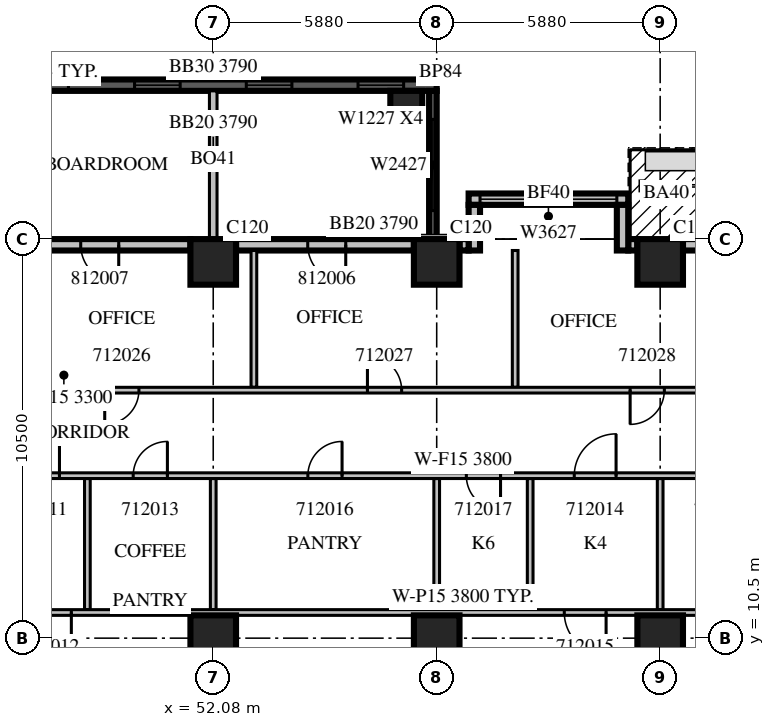
"""IFC4 building model, lengths in metres.
Left out: names, types, materials, properties, quantities, classifications, styles, units other than length and angle.
Written with IfcOpenShell. Run it as: python <this file> out.ifc"""

import sys

from ifc_helpers import new_model, si_unit, direction, frame, frame_2d, origin, origin_2d, place, context, subcontext, project, spatial, rectangle, extrude, source, transform, mapped, element, fill, save


model = new_model("IFC4")
c1 = context("Model", 3, precision=1e-05, world=origin(), true_north=direction((0.0, 1.0)))
c2 = subcontext(c1, "Body", "Model", "MODEL_VIEW")
j1 = project(units=[si_unit("LENGTHUNIT", "METRE"), si_unit("PLANEANGLEUNIT", "RADIAN")], contexts=[c1])
p1 = place(None, origin())
s1 = spatial("IfcSite", under=j1, at=p1, CompositionType="ELEMENT")
p2 = place(p1, origin())
s2 = spatial("IfcBuilding", under=s1, at=p2, CompositionType="ELEMENT")
p3 = place(p2, frame((0.0, 0.0, 61.5)))
s3 = spatial("IfcBuildingStorey", under=s2, at=p3, CompositionType="ELEMENT", Elevation=61.5)
m1 = source(origin(), c2, "Body", "SweptSolid", [
    extrude(rectangle(XDim=1.2, YDim=1.2, at=origin_2d()), origin(), (0.0, 0.0, 1.0), 4.2),
])
for number, where, z_axis, x_axis in (
    (1, (52.08, 10.5, 0.0), (0.0, 0.0, 1.0), (1.0, 0.0, 0.0)),
    (2, (57.96, 10.5, 0.0), (0.0, 0.0, 1.0), (1.0, 0.0, 0.0)),
    (3, (63.84, 10.5, 0.0), (0.0, 0.0, 1.0), (1.0, 0.0, 0.0)),
    (4, (52.08, 20.4, 0.0), (0.0, 0.0, 1.0), (1.0, 0.0, 0.0)),
    (5, (57.96, 20.4, 0.0), (0.0, 0.0, 1.0), (1.0, 0.0, 0.0)),
    (6, (63.84, 20.4, 0.0), (0.0, 0.0, 1.0), (1.0, 0.0, 0.0)),
):
    element("IfcColumn", number, at=place(p3, frame(where, z_axis=z_axis, x_axis=x_axis)), inside=s3, PredefinedType="COLUMN", context=c2, shape_type="MappedRepresentation", body=[
        mapped(m1, transform((0.0, 0.0, 0.0), scale=1.0)),
    ])
m2 = source(origin(), c2, "Body", "SweptSolid", [
    extrude(rectangle(XDim=0.84, YDim=0.84, at=origin_2d()), origin(), (0.0, 0.0, 1.0), 4.2),
])
p4 = place(p3, frame((57.16, 24.48, 0.0), z_axis=(0.0, 0.0, 1.0), x_axis=(1.0, 0.0, 0.0)))
e7 = element("IfcColumn", 7, at=p4, inside=s3, PredefinedType="COLUMN", context=c2, shape_type="MappedRepresentation", body=[
    mapped(m2, transform((0.0, 0.0, 0.0), scale=1.0)),
])
m3 = source(origin(), c2, "Body", "SweptSolid", [
    extrude(rectangle(XDim=11.76, YDim=0.3, at=frame_2d((5.88, 0.0))), origin(), (0.0, 0.0, 1.0), 3.79),
])
p5 = place(p3, frame((57.96, 25.05, 0.0), z_axis=(0.0, 0.0, 1.0), x_axis=(-1.0, 0.0, 0.0)))
e8 = element("IfcWall", 8, at=p5, inside=s3, PredefinedType="SOLIDWALL", context=c2, shape_type="MappedRepresentation", body=[
    mapped(m3, transform((0.0, 0.0, 0.0), scale=1.0)),
])
m4 = source(origin(), c2, "Body", "SweptSolid", [
    extrude(rectangle(XDim=1.2, YDim=2.7, at=frame_2d((0.6, 1.35))), frame((0.0, 0.16, 0.0), z_axis=(0.0, -1.0, 0.0), x_axis=(1.0, 0.0, 0.0)), (0.0, 0.0, 1.0), 0.32),
])
p6 = place(p5, frame((0.87, 0.0, 0.6)))
e9 = element("IfcOpeningElement", 9, at=p6, cuts=e8, PredefinedType="OPENING", context=c2, shape_type="MappedRepresentation", body=[
    mapped(m4, transform((0.0, 0.0, 0.0), scale=1.0)),
])
p7 = place(p5, frame((3.81, 0.0, 0.6)))
e10 = element("IfcOpeningElement", 10, at=p7, cuts=e8, PredefinedType="OPENING", context=c2, shape_type="MappedRepresentation", body=[
    mapped(m4, transform((0.0, 0.0, 0.0), scale=1.0)),
])
p8 = place(p5, frame((6.75, 0.0, 0.6)))
e11 = element("IfcOpeningElement", 11, at=p8, cuts=e8, PredefinedType="OPENING", context=c2, shape_type="MappedRepresentation", body=[
    mapped(m4, transform((0.0, 0.0, 0.0), scale=1.0)),
])
p9 = place(p5, frame((9.69, 0.0, 0.6)))
e12 = element("IfcOpeningElement", 12, at=p9, cuts=e8, PredefinedType="OPENING", context=c2, shape_type="MappedRepresentation", body=[
    mapped(m4, transform((0.0, 0.0, 0.0), scale=1.0)),
])
m5 = source(origin(), c2, "Body", "SweptSolid", [
    extrude(rectangle(XDim=3.9, YDim=0.2, at=frame_2d((1.95, 0.0))), origin(), (0.0, 0.0, 1.0), 3.79),
])
p10 = place(p3, frame((52.08, 21.0, 0.0), z_axis=(0.0, 0.0, 1.0), x_axis=(0.0, 1.0, 0.0)))
e13 = element("IfcWall", 13, at=p10, inside=s3, PredefinedType="SOLIDWALL", context=c2, shape_type="MappedRepresentation", body=[
    mapped(m5, transform((0.0, 0.0, 0.0), scale=1.0)),
])
m6 = source(origin(), c2, "Body", "SweptSolid", [
    extrude(rectangle(XDim=3.9, YDim=0.2, at=frame_2d((1.95, 0.0))), origin(), (0.0, 0.0, 1.0), 3.79),
])
p11 = place(p3, frame((57.86, 21.0, 0.0), z_axis=(0.0, 0.0, 1.0), x_axis=(0.0, 1.0, 0.0)))
e14 = element("IfcWall", 14, at=p11, inside=s3, PredefinedType="SOLIDWALL", context=c2, shape_type="MappedRepresentation", body=[
    mapped(m6, transform((0.0, 0.0, 0.0), scale=1.0)),
])
m7 = source(origin(), c2, "Body", "SweptSolid", [
    extrude(rectangle(XDim=2.4, YDim=2.7, at=frame_2d((1.2, 1.35))), frame((0.0, 0.11, 0.0), z_axis=(0.0, -1.0, 0.0), x_axis=(1.0, 0.0, 0.0)), (0.0, 0.0, 1.0), 0.22),
])
p12 = place(p11, frame((0.75, 0.0, 0.6)))
e15 = element("IfcOpeningElement", 15, at=p12, cuts=e14, PredefinedType="OPENING", context=c2, shape_type="MappedRepresentation", body=[
    mapped(m7, transform((0.0, 0.0, 0.0), scale=1.0)),
])
m8 = source(origin(), c2, "Body", "SweptSolid", [
    extrude(rectangle(XDim=2.76, YDim=0.3, at=frame_2d((1.38, 0.0))), origin(), (0.0, 0.0, 1.0), 3.8),
])
p13 = place(p3, frame((67.2, 20.85, 0.0), z_axis=(0.0, 0.0, 1.0), x_axis=(-1.0, 0.0, 0.0)))
e16 = element("IfcWall", 16, at=p13, inside=s3, PredefinedType="STANDARD", context=c2, shape_type="MappedRepresentation", body=[
    mapped(m8, transform((0.0, 0.0, 0.0), scale=1.0)),
])
m9 = source(origin(), c2, "Body", "SweptSolid", [
    extrude(rectangle(XDim=1.8, YDim=2.4, at=frame_2d((0.9, 1.2))), frame((0.0, 0.16, 0.0), z_axis=(0.0, -1.0, 0.0), x_axis=(1.0, 0.0, 0.0)), (0.0, 0.0, 1.0), 0.32),
])
p14 = place(p13, frame((0.45, 0.0, 0.0)))
e17 = element("IfcOpeningElement", 17, at=p14, cuts=e16, PredefinedType="OPENING", context=c2, shape_type="MappedRepresentation", body=[
    mapped(m9, transform((0.0, 0.0, 0.0), scale=1.0)),
])
m10 = source(origin(), c2, "Body", "SweptSolid", [
    extrude(rectangle(XDim=0.24, YDim=0.3, at=frame_2d((0.12, 0.0))), origin(), (0.0, 0.0, 1.0), 3.8),
])
p15 = place(p3, frame((63.24, 20.85, 0.0), z_axis=(0.0, 0.0, 1.0), x_axis=(-1.0, 0.0, 0.0)))
e18 = element("IfcWall", 18, at=p15, inside=s3, PredefinedType="STANDARD", context=c2, shape_type="MappedRepresentation", body=[
    mapped(m10, transform((0.0, 0.0, 0.0), scale=1.0)),
])
m11 = source(origin(), c2, "Body", "SweptSolid", [
    extrude(rectangle(XDim=4.2, YDim=0.3, at=frame_2d((2.1, 0.0))), origin(), (0.0, 0.0, 1.0), 3.8),
])
p16 = place(p3, frame((63.0, 22.05, 0.0), z_axis=(0.0, 0.0, 1.0), x_axis=(-1.0, 0.0, 0.0)))
e19 = element("IfcWall", 19, at=p16, inside=s3, PredefinedType="STANDARD", context=c2, shape_type="MappedRepresentation", body=[
    mapped(m11, transform((0.0, 0.0, 0.0), scale=1.0)),
])
m12 = source(origin(), c2, "Body", "SweptSolid", [
    extrude(rectangle(XDim=3.6, YDim=2.7, at=frame_2d((1.8, 1.35))), frame((0.0, 0.16, 0.0), z_axis=(0.0, -1.0, 0.0), x_axis=(1.0, 0.0, 0.0)), (0.0, 0.0, 1.0), 0.32),
])
p17 = place(p16, frame((0.3, 0.0, 0.6)))
e20 = element("IfcOpeningElement", 20, at=p17, cuts=e19, PredefinedType="OPENING", context=c2, shape_type="MappedRepresentation", body=[
    mapped(m12, transform((0.0, 0.0, 0.0), scale=1.0)),
])
m13 = source(origin(), c2, "Body", "SweptSolid", [
    extrude(rectangle(XDim=1.2, YDim=0.3, at=frame_2d((0.6, 0.0))), origin(), (0.0, 0.0, 1.0), 3.8),
])
for number, where, z_axis, x_axis in (
    (21, (62.85, 20.7, 0.0), (0.0, 0.0, 1.0), (0.0, 1.0, 0.0)),
    (22, (58.95, 20.7, 0.0), (0.0, 0.0, 1.0), (0.0, 1.0, 0.0)),
):
    element("IfcWall", number, at=place(p3, frame(where, z_axis=z_axis, x_axis=x_axis)), inside=s3, PredefinedType="STANDARD", context=c2, shape_type="MappedRepresentation", body=[
        mapped(m13, transform((0.0, 0.0, 0.0), scale=1.0)),
    ])
p18 = place(p3, frame((58.8, 20.85, 0.0), z_axis=(0.0, 0.0, 1.0), x_axis=(-1.0, 0.0, 0.0)))
e23 = element("IfcWall", 23, at=p18, inside=s3, PredefinedType="STANDARD", context=c2, shape_type="MappedRepresentation", body=[
    mapped(m10, transform((0.0, 0.0, 0.0), scale=1.0)),
])
m14 = source(origin(), c2, "Body", "SweptSolid", [
    extrude(rectangle(XDim=4.68, YDim=0.3, at=frame_2d((2.34, 0.0))), origin(), (0.0, 0.0, 1.0), 3.8),
])
p19 = place(p3, frame((57.36, 20.85, 0.0), z_axis=(0.0, 0.0, 1.0), x_axis=(-1.0, 0.0, 0.0)))
e24 = element("IfcWall", 24, at=p19, inside=s3, PredefinedType="STANDARD", context=c2, shape_type="MappedRepresentation", body=[
    mapped(m14, transform((0.0, 0.0, 0.0), scale=1.0)),
])
m15 = source(origin(), c2, "Body", "SweptSolid", [
    extrude(rectangle(XDim=1.0, YDim=2.1, at=frame_2d((0.5, 1.05))), frame((0.0, 0.16, 0.0), z_axis=(0.0, -1.0, 0.0), x_axis=(1.0, 0.0, 0.0)), (0.0, 0.0, 1.0), 0.32),
])
p20 = place(p19, frame((1.793, 0.0, 0.0)))
e25 = element("IfcOpeningElement", 25, at=p20, cuts=e24, PredefinedType="OPENING", context=c2, shape_type="MappedRepresentation", body=[
    mapped(m15, transform((0.0, 0.0, 0.0), scale=1.0)),
])
p21 = place(p3, frame((51.48, 20.85, 0.0), z_axis=(0.0, 0.0, 1.0), x_axis=(-1.0, 0.0, 0.0)))
e26 = element("IfcWall", 26, at=p21, inside=s3, PredefinedType="STANDARD", context=c2, shape_type="MappedRepresentation", body=[
    mapped(m14, transform((0.0, 0.0, 0.0), scale=1.0)),
])
p22 = place(p21, frame((1.887, 0.0, 0.0)))
e27 = element("IfcOpeningElement", 27, at=p22, cuts=e26, PredefinedType="OPENING", context=c2, shape_type="MappedRepresentation", body=[
    mapped(m15, transform((0.0, 0.0, 0.0), scale=1.0)),
])
m16 = source(origin(), c2, "Body", "SweptSolid", [
    extrude(rectangle(XDim=3.45, YDim=0.15, at=frame_2d((1.725, 0.0))), origin(), (0.0, 0.0, 1.0), 3.8),
])
for number, where, z_axis, x_axis in (
    (28, (48.768, 11.25, 0.0), (0.0, 0.0, 1.0), (0.0, 1.0, 0.0)),
    (29, (57.96, 11.25, 0.0), (0.0, 0.0, 1.0), (0.0, 1.0, 0.0)),
    (30, (60.42, 11.25, 0.0), (0.0, 0.0, 1.0), (0.0, 1.0, 0.0)),
    (31, (52.08, 11.25, 0.0), (0.0, 0.0, 1.0), (0.0, 1.0, 0.0)),
    (32, (63.84, 11.25, 0.0), (0.0, 0.0, 1.0), (0.0, 1.0, 0.0)),
):
    element("IfcWall", number, at=place(p3, frame(where, z_axis=z_axis, x_axis=x_axis)), inside=s3, PredefinedType="PARTITIONING", context=c2, shape_type="MappedRepresentation", body=[
        mapped(m16, transform((0.0, 0.0, 0.0), scale=1.0)),
    ])
m17 = source(origin(), c2, "Body", "SweptSolid", [
    extrude(rectangle(XDim=24.9, YDim=0.15, at=frame_2d((12.45, 0.0))), origin(), (0.0, 0.0, 1.0), 3.8),
])
p23 = place(p3, frame((71.1, 11.175, 0.0), z_axis=(0.0, 0.0, 1.0), x_axis=(-1.0, 0.0, 0.0)))
e33 = element("IfcWall", 33, at=p23, inside=s3, PredefinedType="PARTITIONING", context=c2, shape_type="MappedRepresentation", body=[
    mapped(m17, transform((0.0, 0.0, 0.0), scale=1.0)),
])
m18 = source(origin(), c2, "Body", "SweptSolid", [
    extrude(rectangle(XDim=1.1, YDim=2.1, at=frame_2d((0.55, 1.05))), frame((0.0, 0.085, 0.0), z_axis=(0.0, -1.0, 0.0), x_axis=(1.0, 0.0, 0.0)), (0.0, 0.0, 1.0), 0.17),
])
p24 = place(p23, frame((22.753, 0.0, 0.0)))
e34 = element("IfcOpeningElement", 34, at=p24, cuts=e33, PredefinedType="OPENING", context=c2, shape_type="MappedRepresentation", body=[
    mapped(m18, transform((0.0, 0.0, 0.0), scale=1.0)),
])
p25 = place(p23, frame((8.683, 0.0, 0.0)))
e35 = element("IfcOpeningElement", 35, at=p25, cuts=e33, PredefinedType="OPENING", context=c2, shape_type="MappedRepresentation", body=[
    mapped(m18, transform((0.0, 0.0, 0.0), scale=1.0)),
])
p26 = place(p23, frame((4.738, 0.0, 0.0)))
e36 = element("IfcOpeningElement", 36, at=p26, cuts=e33, PredefinedType="OPENING", context=c2, shape_type="MappedRepresentation", body=[
    mapped(m18, transform((0.0, 0.0, 0.0), scale=1.0)),
])
m19 = source(origin(), c2, "Body", "SweptSolid", [
    extrude(rectangle(XDim=3.6, YDim=0.15, at=frame_2d((1.8, 0.0))), origin(), (0.0, 0.0, 1.0), 3.8),
])
for number, where, z_axis, x_axis in (
    (37, (53.15, 20.7, 0.0), (0.0, 0.0, 1.0), (0.0, -1.0, 0.0)),
    (38, (60.025, 20.7, 0.0), (0.0, 0.0, 1.0), (0.0, -1.0, 0.0)),
):
    element("IfcWall", number, at=place(p3, frame(where, z_axis=z_axis, x_axis=x_axis)), inside=s3, PredefinedType="PARTITIONING", context=c2, shape_type="MappedRepresentation", body=[
        mapped(m19, transform((0.0, 0.0, 0.0), scale=1.0)),
    ])
p27 = place(p3, frame((71.1, 14.775, 0.0), z_axis=(0.0, 0.0, 1.0), x_axis=(-1.0, 0.0, 0.0)))
e39 = element("IfcWall", 39, at=p27, inside=s3, PredefinedType="PARTITIONING", context=c2, shape_type="MappedRepresentation", body=[
    mapped(m17, transform((0.0, 0.0, 0.0), scale=1.0)),
])
p28 = place(p27, frame((23.066, 0.0, 0.0)))
e40 = element("IfcOpeningElement", 40, at=p28, cuts=e39, PredefinedType="OPENING", context=c2, shape_type="MappedRepresentation", body=[
    mapped(m18, transform((0.0, 0.0, 0.0), scale=1.0)),
])
m20 = source(origin(), c2, "Body", "SweptSolid", [
    extrude(rectangle(XDim=0.9, YDim=2.1, at=frame_2d((0.45, 1.05))), frame((0.0, 0.085, 0.0), z_axis=(0.0, -1.0, 0.0), x_axis=(1.0, 0.0, 0.0)), (0.0, 0.0, 1.0), 0.17),
])
p29 = place(p27, frame((20.226, 0.0, 0.0)))
e41 = element("IfcOpeningElement", 41, at=p29, cuts=e39, PredefinedType="OPENING", context=c2, shape_type="MappedRepresentation", body=[
    mapped(m20, transform((0.0, 0.0, 0.0), scale=1.0)),
])
p30 = place(p27, frame((8.42, 0.0, 0.0)))
e42 = element("IfcOpeningElement", 42, at=p30, cuts=e39, PredefinedType="OPENING", context=c2, shape_type="MappedRepresentation", body=[
    mapped(m18, transform((0.0, 0.0, 0.0), scale=1.0)),
])
p31 = place(p27, frame((15.63, 0.0, 0.0)))
e43 = element("IfcOpeningElement", 43, at=p31, cuts=e39, PredefinedType="OPENING", context=c2, shape_type="MappedRepresentation", body=[
    mapped(m20, transform((0.0, 0.0, 0.0), scale=1.0)),
])
p32 = place(p27, frame((11.46, 0.0, 0.0)))
e44 = element("IfcOpeningElement", 44, at=p32, cuts=e39, PredefinedType="OPENING", context=c2, shape_type="MappedRepresentation", body=[
    mapped(m20, transform((0.0, 0.0, 0.0), scale=1.0)),
])
p33 = place(p27, frame((5.051, 0.0, 0.0)))
e45 = element("IfcOpeningElement", 45, at=p33, cuts=e39, PredefinedType="OPENING", context=c2, shape_type="MappedRepresentation", body=[
    mapped(m18, transform((0.0, 0.0, 0.0), scale=1.0)),
])
p34 = place(p27, frame((1.483, 0.0, 0.0)))
e46 = element("IfcOpeningElement", 46, at=p34, cuts=e39, PredefinedType="OPENING", context=c2, shape_type="MappedRepresentation", body=[
    mapped(m20, transform((0.0, 0.0, 0.0), scale=1.0)),
])
m21 = source(origin(), c2, "Body", "SweptSolid", [
    extrude(rectangle(XDim=37.5, YDim=0.15, at=frame_2d((18.75, 0.0))), origin(), (0.0, 0.0, 1.0), 3.3),
])
p35 = place(p3, frame((29.4, 17.025, 0.0), z_axis=(0.0, 0.0, 1.0), x_axis=(1.0, 0.0, 0.0)))
e47 = element("IfcWall", 47, at=p35, inside=s3, PredefinedType="PARTITIONING", context=c2, shape_type="MappedRepresentation", body=[
    mapped(m21, transform((0.0, 0.0, 0.0), scale=1.0)),
])
m22 = source(origin(), c2, "Body", "SweptSolid", [
    extrude(rectangle(XDim=1.0, YDim=2.1, at=frame_2d((0.5, 1.05))), frame((0.0, 0.085, 0.0), z_axis=(0.0, -1.0, 0.0), x_axis=(1.0, 0.0, 0.0)), (0.0, 0.0, 1.0), 0.17),
])
p36 = place(p35, frame((1.357, 0.0, 0.0)))
e48 = element("IfcOpeningElement", 48, at=p36, cuts=e47, PredefinedType="OPENING", context=c2, shape_type="MappedRepresentation", body=[
    mapped(m22, transform((0.0, 0.0, 0.0), scale=1.0)),
])
p37 = place(p35, frame((4.669, 0.0, 0.0)))
e49 = element("IfcOpeningElement", 49, at=p37, cuts=e47, PredefinedType="OPENING", context=c2, shape_type="MappedRepresentation", body=[
    mapped(m22, transform((0.0, 0.0, 0.0), scale=1.0)),
])
p38 = place(p35, frame((7.012, 0.0, 0.0)))
e50 = element("IfcOpeningElement", 50, at=p38, cuts=e47, PredefinedType="OPENING", context=c2, shape_type="MappedRepresentation", body=[
    mapped(m22, transform((0.0, 0.0, 0.0), scale=1.0)),
])
p39 = place(p35, frame((10.05, 0.0, 0.0)))
e51 = element("IfcOpeningElement", 51, at=p39, cuts=e47, PredefinedType="OPENING", context=c2, shape_type="MappedRepresentation", body=[
    mapped(m20, transform((0.0, 0.0, 0.0), scale=1.0)),
])
p40 = place(p35, frame((14.25, 0.0, 0.0)))
e52 = element("IfcOpeningElement", 52, at=p40, cuts=e47, PredefinedType="OPENING", context=c2, shape_type="MappedRepresentation", body=[
    mapped(m20, transform((0.0, 0.0, 0.0), scale=1.0)),
])
p41 = place(p35, frame((19.825, 0.0, 0.0)))
e53 = element("IfcOpeningElement", 53, at=p41, cuts=e47, PredefinedType="OPENING", context=c2, shape_type="MappedRepresentation", body=[
    mapped(m20, transform((0.0, 0.0, 0.0), scale=1.0)),
])
p42 = place(p35, frame((26.738, 0.0, 0.0)))
e54 = element("IfcOpeningElement", 54, at=p42, cuts=e47, PredefinedType="OPENING", context=c2, shape_type="MappedRepresentation", body=[
    mapped(m20, transform((0.0, 0.0, 0.0), scale=1.0)),
])
p43 = place(p35, frame((33.65, 0.0, 0.0)))
e55 = element("IfcOpeningElement", 55, at=p43, cuts=e47, PredefinedType="OPENING", context=c2, shape_type="MappedRepresentation", body=[
    mapped(m20, transform((0.0, 0.0, 0.0), scale=1.0)),
])
m23 = source(origin(), c2, "Body", "SweptSolid", [
    extrude(rectangle(XDim=1.2, YDim=2.7, at=frame_2d((0.6, 1.35))), frame((0.0, 0.03, 0.0), z_axis=(0.0, -1.0, 0.0), x_axis=(1.0, 0.0, 0.0)), (0.0, 0.0, 1.0), 0.06),
])
p44 = place(p6, origin())
e56 = element("IfcWindow", 56, at=p44, inside=s3, PartitioningType="SINGLE_PANEL", PredefinedType="WINDOW", context=c2, shape_type="MappedRepresentation", body=[
    mapped(m23, transform((0.0, 0.0, 0.0), scale=1.0)),
])
fill(e9, e56)
p45 = place(p7, origin())
e57 = element("IfcWindow", 57, at=p45, inside=s3, PartitioningType="SINGLE_PANEL", PredefinedType="WINDOW", context=c2, shape_type="MappedRepresentation", body=[
    mapped(m23, transform((0.0, 0.0, 0.0), scale=1.0)),
])
fill(e10, e57)
p46 = place(p8, origin())
e58 = element("IfcWindow", 58, at=p46, inside=s3, PartitioningType="SINGLE_PANEL", PredefinedType="WINDOW", context=c2, shape_type="MappedRepresentation", body=[
    mapped(m23, transform((0.0, 0.0, 0.0), scale=1.0)),
])
fill(e11, e58)
p47 = place(p9, origin())
e59 = element("IfcWindow", 59, at=p47, inside=s3, PartitioningType="SINGLE_PANEL", PredefinedType="WINDOW", context=c2, shape_type="MappedRepresentation", body=[
    mapped(m23, transform((0.0, 0.0, 0.0), scale=1.0)),
])
fill(e12, e59)
m24 = source(origin(), c2, "Body", "SweptSolid", [
    extrude(rectangle(XDim=2.4, YDim=2.7, at=frame_2d((1.2, 1.35))), frame((0.0, 0.03, 0.0), z_axis=(0.0, -1.0, 0.0), x_axis=(1.0, 0.0, 0.0)), (0.0, 0.0, 1.0), 0.06),
])
p48 = place(p12, origin())
e60 = element("IfcWindow", 60, at=p48, inside=s3, PartitioningType="SINGLE_PANEL", PredefinedType="WINDOW", context=c2, shape_type="MappedRepresentation", body=[
    mapped(m24, transform((0.0, 0.0, 0.0), scale=1.0)),
])
fill(e15, e60)
m25 = source(origin(), c2, "Body", "SweptSolid", [
    extrude(rectangle(XDim=3.6, YDim=2.7, at=frame_2d((1.8, 1.35))), frame((0.0, 0.03, 0.0), z_axis=(0.0, -1.0, 0.0), x_axis=(1.0, 0.0, 0.0)), (0.0, 0.0, 1.0), 0.06),
])
p49 = place(p17, origin())
e61 = element("IfcWindow", 61, at=p49, inside=s3, PartitioningType="SINGLE_PANEL", PredefinedType="WINDOW", context=c2, shape_type="MappedRepresentation", body=[
    mapped(m25, transform((0.0, 0.0, 0.0), scale=1.0)),
])
fill(e20, e61)
m26 = source(origin(), c2, "Body", "SweptSolid", [
    extrude(rectangle(XDim=1.1, YDim=2.1, at=frame_2d((0.55, 1.05))), frame((0.0, 0.025, 0.0), z_axis=(0.0, -1.0, 0.0), x_axis=(1.0, 0.0, 0.0)), (0.0, 0.0, 1.0), 0.05),
])
p50 = place(p28, origin())
e62 = element("IfcDoor", 62, at=p50, inside=s3, OperationType="SINGLE_SWING_RIGHT", PredefinedType="DOOR", context=c2, shape_type="MappedRepresentation", body=[
    mapped(m26, transform((0.0, 0.0, 0.0), scale=1.0)),
])
fill(e40, e62)
p51 = place(p24, origin())
e63 = element("IfcDoor", 63, at=p51, inside=s3, OperationType="SINGLE_SWING_LEFT", PredefinedType="DOOR", context=c2, shape_type="MappedRepresentation", body=[
    mapped(m26, transform((0.0, 0.0, 0.0), scale=1.0)),
])
fill(e34, e63)
m27 = source(origin(), c2, "Body", "SweptSolid", [
    extrude(rectangle(XDim=0.9, YDim=2.1, at=frame_2d((0.45, 1.05))), frame((0.0, 0.025, 0.0), z_axis=(0.0, -1.0, 0.0), x_axis=(1.0, 0.0, 0.0)), (0.0, 0.0, 1.0), 0.05),
])
p52 = place(p29, origin())
e64 = element("IfcDoor", 64, at=p52, inside=s3, OperationType="SINGLE_SWING_RIGHT", PredefinedType="DOOR", context=c2, shape_type="MappedRepresentation", body=[
    mapped(m27, transform((0.0, 0.0, 0.0), scale=1.0)),
])
fill(e41, e64)
p53 = place(p30, origin())
e65 = element("IfcDoor", 65, at=p53, inside=s3, OperationType="SINGLE_SWING_RIGHT", PredefinedType="DOOR", context=c2, shape_type="MappedRepresentation", body=[
    mapped(m26, transform((0.0, 0.0, 0.0), scale=1.0)),
])
fill(e42, e65)
p54 = place(p25, origin())
e66 = element("IfcDoor", 66, at=p54, inside=s3, OperationType="SINGLE_SWING_LEFT", PredefinedType="DOOR", context=c2, shape_type="MappedRepresentation", body=[
    mapped(m26, transform((0.0, 0.0, 0.0), scale=1.0)),
])
fill(e35, e66)
p55 = place(p31, origin())
e67 = element("IfcDoor", 67, at=p55, inside=s3, OperationType="SINGLE_SWING_RIGHT", PredefinedType="DOOR", context=c2, shape_type="MappedRepresentation", body=[
    mapped(m27, transform((0.0, 0.0, 0.0), scale=1.0)),
])
fill(e43, e67)
p56 = place(p32, origin())
e68 = element("IfcDoor", 68, at=p56, inside=s3, OperationType="SINGLE_SWING_LEFT", PredefinedType="DOOR", context=c2, shape_type="MappedRepresentation", body=[
    mapped(m27, transform((0.0, 0.0, 0.0), scale=1.0)),
])
fill(e44, e68)
p57 = place(p41, origin())
e69 = element("IfcDoor", 69, at=p57, inside=s3, OperationType="SINGLE_SWING_RIGHT", PredefinedType="DOOR", context=c2, shape_type="MappedRepresentation", body=[
    mapped(m27, transform((0.0, 0.0, 0.0), scale=1.0)),
])
fill(e53, e69)
p58 = place(p42, origin())
e70 = element("IfcDoor", 70, at=p58, inside=s3, OperationType="SINGLE_SWING_LEFT", PredefinedType="DOOR", context=c2, shape_type="MappedRepresentation", body=[
    mapped(m27, transform((0.0, 0.0, 0.0), scale=1.0)),
])
fill(e54, e70)
p59 = place(p43, origin())
e71 = element("IfcDoor", 71, at=p59, inside=s3, OperationType="SINGLE_SWING_RIGHT", PredefinedType="DOOR", context=c2, shape_type="MappedRepresentation", body=[
    mapped(m27, transform((0.0, 0.0, 0.0), scale=1.0)),
])
fill(e55, e71)
m28 = source(origin(), c2, "Body", "SweptSolid", [
    extrude(rectangle(XDim=1.0, YDim=2.1, at=frame_2d((0.5, 1.05))), frame((0.0, 0.025, 0.0), z_axis=(0.0, -1.0, 0.0), x_axis=(1.0, 0.0, 0.0)), (0.0, 0.0, 1.0), 0.05),
])
p60 = place(p20, origin())
e72 = element("IfcDoor", 72, at=p60, inside=s3, OperationType="SINGLE_SWING_LEFT", PredefinedType="DOOR", context=c2, shape_type="MappedRepresentation", body=[
    mapped(m28, transform((0.0, 0.0, 0.0), scale=1.0)),
])
fill(e25, e72)
p61 = place(p22, origin())
e73 = element("IfcDoor", 73, at=p61, inside=s3, OperationType="SINGLE_SWING_LEFT", PredefinedType="DOOR", context=c2, shape_type="MappedRepresentation", body=[
    mapped(m28, transform((0.0, 0.0, 0.0), scale=1.0)),
])
fill(e27, e73)
save(model, sys.argv[1])
